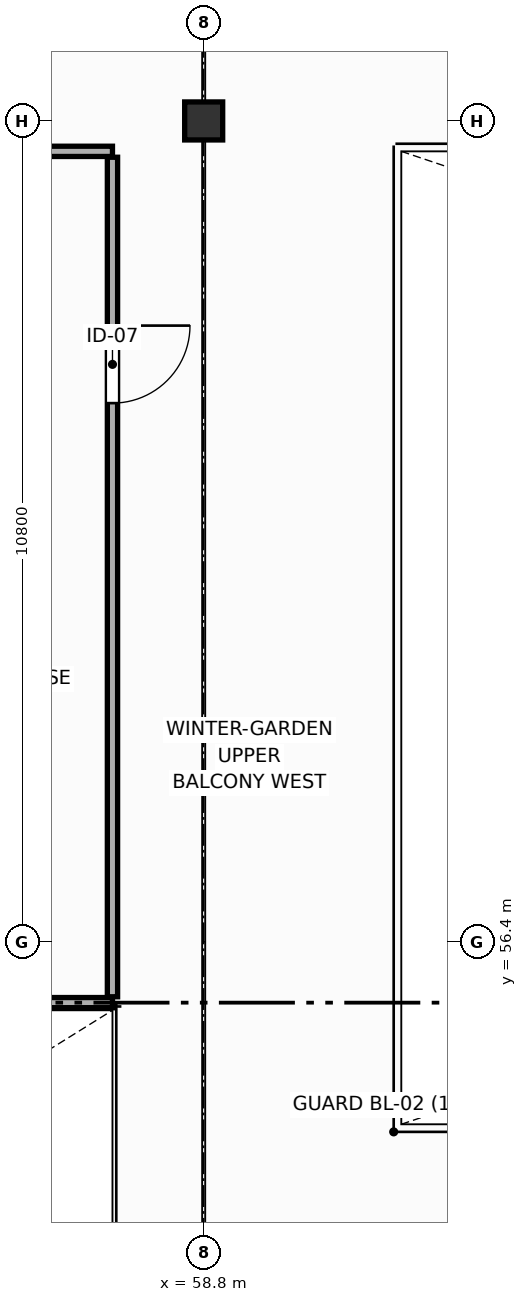
"""IFC4 building model, lengths in metres.
Left out: names, types, materials, properties, quantities, classifications, styles, units other than length and angle.
Written with IfcOpenShell. Run it as: python <this file> out.ifc"""

import sys

from ifc_helpers import new_model, si_unit, direction, frame, frame_2d, origin, origin_2d, place, context, subcontext, project, spatial, rectangle, extrude, element, fill, save


model = new_model("IFC4")
c1 = context("Model", 3, precision=1e-05, world=origin(), true_north=direction((0.0, 1.0)))
c2 = subcontext(c1, "Body", "Model", "MODEL_VIEW")
j1 = project(units=[si_unit("LENGTHUNIT", "METRE"), si_unit("PLANEANGLEUNIT", "RADIAN")], contexts=[c1])
p1 = place(None, origin())
s1 = spatial("IfcSite", under=j1, at=p1, CompositionType="ELEMENT")
p2 = place(p1, origin())
s2 = spatial("IfcBuilding", under=s1, at=p2, CompositionType="ELEMENT")
p3 = place(p2, frame((0.0, 0.0, 9.9)))
s3 = spatial("IfcBuildingStorey", under=s2, at=p3, CompositionType="ELEMENT", Elevation=9.9)
p4 = place(p3, frame((58.8, 67.2, 0.0), z_axis=(0.0, 0.0, 1.0), x_axis=(1.0, 0.0, 0.0)))
e1 = element("IfcColumn", 1, at=p4, inside=s3, PredefinedType="COLUMN", context=c2, shape_type="SweptSolid", body=[
    extrude(rectangle(XDim=0.5, YDim=0.5, at=origin_2d()), origin(), (0.0, 0.0, 1.0), 4.5),
])
p5 = place(p3, frame((46.8, 66.8, 0.0), z_axis=(0.0, 0.0, 1.0), x_axis=(1.0, 0.0, 0.0)))
e2 = element("IfcWall", 2, at=p5, inside=s3, PredefinedType="PARTITIONING", context=c2, shape_type="SweptSolid", body=[
    extrude(rectangle(XDim=10.8, YDim=0.135, at=frame_2d((5.4, 0.0))), origin(), (0.0, 0.0, 1.0), 3.38),
])
p6 = place(p3, frame((57.6, 55.6, 0.0), z_axis=(0.0, 0.0, 1.0), x_axis=(-1.0, 0.0, 0.0)))
e3 = element("IfcWall", 3, at=p6, inside=s3, PredefinedType="PARTITIONING", context=c2, shape_type="SweptSolid", body=[
    extrude(rectangle(XDim=10.8, YDim=0.135, at=frame_2d((5.4, 0.0))), origin(), (0.0, 0.0, 1.0), 4.235),
])
p7 = place(p3, frame((57.6, 66.722, 0.0), z_axis=(0.0, 0.0, 1.0), x_axis=(0.0, -1.0, 0.0)))
e4 = element("IfcWall", 4, at=p7, inside=s3, PredefinedType="PARTITIONING", context=c2, shape_type="SweptSolid", body=[
    extrude(rectangle(XDim=11.045, YDim=0.135, at=frame_2d((5.522, 0.0))), origin(), (0.0, 0.0, 1.0), 3.38),
])
p8 = place(p7, frame((2.215, 0.0, 0.0)))
e5 = element("IfcOpeningElement", 5, at=p8, cuts=e4, PredefinedType="OPENING", context=c2, shape_type="SweptSolid", body=[
    extrude(rectangle(XDim=1.02, YDim=2.15, at=frame_2d((0.51, 1.075))), frame((0.0, 0.077, 0.0), z_axis=(0.0, -1.0, 0.0), x_axis=(1.0, 0.0, 0.0)), (0.0, 0.0, 1.0), 0.155),
])
p9 = place(p8, origin())
e6 = element("IfcDoor", 6, at=p9, inside=s3, OperationType="SINGLE_SWING_LEFT", PredefinedType="DOOR", context=c2, shape_type="SweptSolid", body=[
    extrude(rectangle(XDim=1.02, YDim=2.15, at=frame_2d((0.51, 1.075))), frame((0.0, 0.025, 0.0), z_axis=(0.0, -1.0, 0.0), x_axis=(1.0, 0.0, 0.0)), (0.0, 0.0, 1.0), 0.05),
])
fill(e5, e6)
save(model, sys.argv[1])
